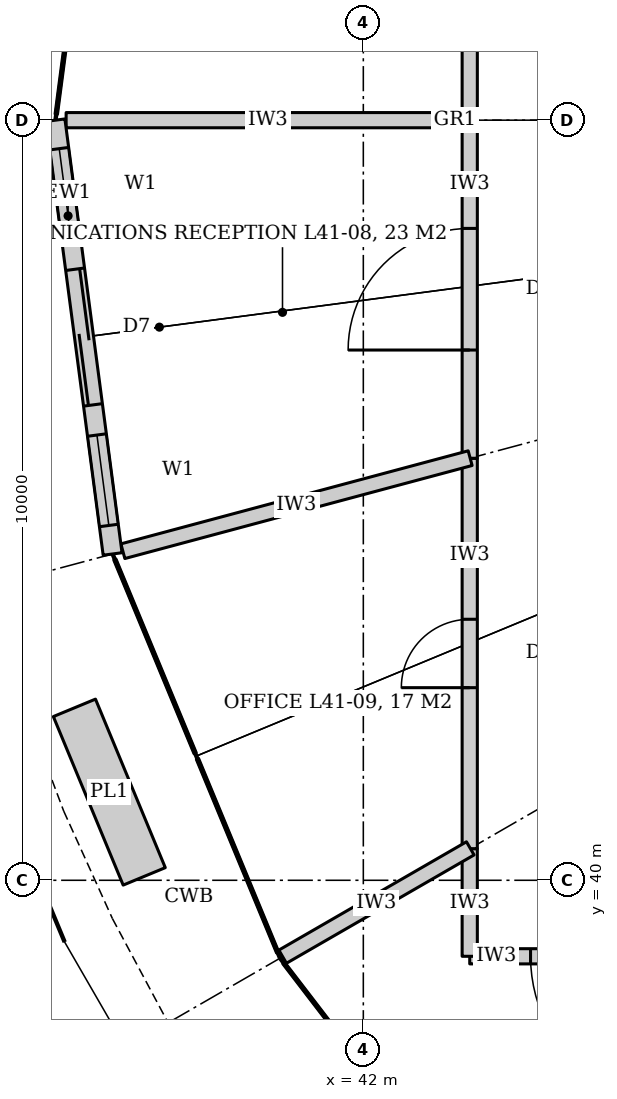
"""IFC4 building model, lengths in metres.
Left out: names, types, materials, properties, quantities, classifications, styles, units other than length and angle.
Written with IfcOpenShell. Run it as: python <this file> out.ifc"""

import sys

from ifc_helpers import new_model, si_unit, direction, frame, frame_2d, origin, place, context, subcontext, project, spatial, rectangle, extrude, element, fill, save


model = new_model("IFC4")
c1 = context("Model", 3, precision=1e-05, world=origin(), true_north=direction((0.0, 1.0)))
c2 = subcontext(c1, "Body", "Model", "MODEL_VIEW")
j1 = project(units=[si_unit("LENGTHUNIT", "METRE"), si_unit("PLANEANGLEUNIT", "RADIAN")], contexts=[c1])
p1 = place(None, origin())
s1 = spatial("IfcSite", under=j1, at=p1, CompositionType="ELEMENT")
p2 = place(p1, origin())
s2 = spatial("IfcBuilding", under=s1, at=p2, CompositionType="ELEMENT")
p3 = place(p2, frame((0.0, 0.0, 173.0)))
s3 = spatial("IfcBuildingStorey", under=s2, at=p3, CompositionType="ELEMENT", Elevation=173.0)
p4 = place(p3, frame((47.0, 39.0, 0.0), z_axis=(0.0, 0.0, 1.0), x_axis=(-1.0, 0.0, 0.0)))
e1 = element("IfcWall", 1, at=p4, inside=s3, PredefinedType="PARTITIONING", context=c2, shape_type="SweptSolid", body=[
    extrude(rectangle(XDim=3.6, YDim=0.2, at=frame_2d((1.8, 0.0))), origin(), (0.0, 0.0, 1.0), 3.04),
])
p5 = place(p4, frame((0.8, 0.0, 0.0)))
e2 = element("IfcOpeningElement", 2, at=p5, cuts=e1, PredefinedType="OPENING", context=c2, shape_type="SweptSolid", body=[
    extrude(rectangle(XDim=2.0, YDim=2.1, at=frame_2d((1.0, 1.05))), frame((0.0, 0.11, 0.0), z_axis=(0.0, -1.0, 0.0), x_axis=(1.0, 0.0, 0.0)), (0.0, 0.0, 1.0), 0.22),
])
p6 = place(p3, frame((43.4, 39.0, 0.0), z_axis=(0.0, 0.0, 1.0), x_axis=(0.0, 1.0, 0.0)))
e3 = element("IfcWall", 3, at=p6, inside=s3, PredefinedType="PARTITIONING", context=c2, shape_type="SweptSolid", body=[
    extrude(rectangle(XDim=1.416, YDim=0.2, at=frame_2d((0.708, 0.0))), origin(), (0.0, 0.0, 1.0), 3.012),
])
p7 = place(p3, frame((43.4, 40.416, 0.0), z_axis=(0.0, 0.0, 1.0), x_axis=(0.0, 1.0, 0.0)))
e4 = element("IfcWall", 4, at=p7, inside=s3, PredefinedType="PARTITIONING", context=c2, shape_type="SweptSolid", body=[
    extrude(rectangle(XDim=5.136, YDim=0.2, at=frame_2d((2.568, 0.0))), origin(), (0.0, 0.0, 1.0), 3.012),
])
p8 = place(p7, frame((2.118, 0.0, 0.0)))
e5 = element("IfcOpeningElement", 5, at=p8, cuts=e4, PredefinedType="OPENING", context=c2, shape_type="SweptSolid", body=[
    extrude(rectangle(XDim=0.9, YDim=2.4, at=frame_2d((0.45, 1.2))), frame((0.0, 0.11, 0.0), z_axis=(0.0, -1.0, 0.0), x_axis=(1.0, 0.0, 0.0)), (0.0, 0.0, 1.0), 0.22),
])
p9 = place(p3, frame((43.4, 45.552, 0.0), z_axis=(0.0, 0.0, 1.0), x_axis=(0.0, 1.0, 0.0)))
e6 = element("IfcWall", 6, at=p9, inside=s3, PredefinedType="PARTITIONING", context=c2, shape_type="SweptSolid", body=[
    extrude(rectangle(XDim=4.448, YDim=0.2, at=frame_2d((2.224, 0.0))), origin(), (0.0, 0.0, 1.0), 3.012),
])
p10 = place(p9, frame((1.424, 0.0, 0.0)))
e7 = element("IfcOpeningElement", 7, at=p10, cuts=e6, PredefinedType="OPENING", context=c2, shape_type="SweptSolid", body=[
    extrude(rectangle(XDim=1.6, YDim=2.4, at=frame_2d((0.8, 1.2))), frame((0.0, 0.11, 0.0), z_axis=(0.0, -1.0, 0.0), x_axis=(1.0, 0.0, 0.0)), (0.0, 0.0, 1.0), 0.22),
])
p11 = place(p3, frame((43.4, 50.0, 0.0), z_axis=(0.0, 0.0, 1.0), x_axis=(0.0, 1.0, 0.0)))
e8 = element("IfcWall", 8, at=p11, inside=s3, PredefinedType="PARTITIONING", context=c2, shape_type="SweptSolid", body=[
    extrude(rectangle(XDim=9.05, YDim=0.2, at=frame_2d((4.525, 0.0))), origin(), (0.0, 0.0, 1.0), 3.012),
])
p12 = place(p11, frame((4.025, 0.0, 0.0)))
e9 = element("IfcOpeningElement", 9, at=p12, cuts=e8, PredefinedType="OPENING", context=c2, shape_type="SweptSolid", body=[
    extrude(rectangle(XDim=1.0, YDim=2.4, at=frame_2d((0.5, 1.2))), frame((0.0, 0.11, 0.0), z_axis=(0.0, -1.0, 0.0), x_axis=(1.0, 0.0, 0.0)), (0.0, 0.0, 1.0), 0.22),
])
p13 = place(p3, frame((43.4, 50.0, 0.0), z_axis=(0.0, 0.0, 1.0), x_axis=(-1.0, 0.0, 0.0)))
e10 = element("IfcWall", 10, at=p13, inside=s3, PredefinedType="PARTITIONING", context=c2, shape_type="SweptSolid", body=[
    extrude(rectangle(XDim=1.81, YDim=0.125, at=frame_2d((0.905, 0.0))), origin(), (0.0, 0.0, 1.0), 3.012),
])
p14 = place(p3, frame((43.406, 45.553, 0.0), z_axis=(0.0, 0.0, 1.0), x_axis=(-0.965932258808, -0.25879503742, 0.0)))
e11 = element("IfcWall", 11, at=p14, inside=s3, PredefinedType="PARTITIONING", context=c2, shape_type="SweptSolid", body=[
    extrude(rectangle(XDim=4.83, YDim=0.2, at=frame_2d((2.415, 0.0))), origin(), (0.0, 0.0, 1.0), 3.012),
])
p15 = place(p3, frame((43.407, 40.42, 0.0), z_axis=(0.0, 0.0, 1.0), x_axis=(-0.866039495442, -0.49997559174, 0.0)))
e12 = element("IfcWall", 12, at=p15, inside=s3, PredefinedType="PARTITIONING", context=c2, shape_type="SweptSolid", body=[
    extrude(rectangle(XDim=2.95, YDim=0.2, at=frame_2d((1.475, 0.0))), origin(), (0.0, 0.0, 1.0), 3.012),
])
p16 = place(p3, frame((41.45, 50.0, 0.0), z_axis=(0.0, 0.0, 1.0), x_axis=(-0.444556644785, -0.895750740763, 0.0)))
e13 = element("IfcWall", 13, at=p16, inside=s3, PredefinedType="SOLIDWALL", context=c2, shape_type="SweptSolid", body=[
    extrude(rectangle(XDim=6.4, YDim=0.25, at=frame_2d((3.2, 0.0))), origin(), (0.0, 0.0, 1.0), 4.04),
])
p17 = place(p16, frame((2.3, 0.0, 0.0)))
e14 = element("IfcOpeningElement", 14, at=p17, cuts=e13, PredefinedType="OPENING", context=c2, shape_type="SweptSolid", body=[
    extrude(rectangle(XDim=1.8, YDim=2.4, at=frame_2d((0.9, 1.2))), frame((0.0, 0.135, 0.0), z_axis=(0.0, -1.0, 0.0), x_axis=(1.0, 0.0, 0.0)), (0.0, 0.0, 1.0), 0.27),
])
p18 = place(p16, frame((0.7, 0.0, 0.0)))
e15 = element("IfcOpeningElement", 15, at=p18, cuts=e13, PredefinedType="OPENING", context=c2, shape_type="SweptSolid", body=[
    extrude(rectangle(XDim=1.2, YDim=2.4, at=frame_2d((0.6, 1.2))), frame((0.0, 0.135, 0.0), z_axis=(0.0, -1.0, 0.0), x_axis=(1.0, 0.0, 0.0)), (0.0, 0.0, 1.0), 0.27),
])
p19 = place(p16, frame((4.5, 0.0, 0.0)))
e16 = element("IfcOpeningElement", 16, at=p19, cuts=e13, PredefinedType="OPENING", context=c2, shape_type="SweptSolid", body=[
    extrude(rectangle(XDim=1.2, YDim=2.4, at=frame_2d((0.6, 1.2))), frame((0.0, 0.135, 0.0), z_axis=(0.0, -1.0, 0.0), x_axis=(1.0, 0.0, 0.0)), (0.0, 0.0, 1.0), 0.27),
])
p20 = place(p10, origin())
e17 = element("IfcDoor", 17, at=p20, inside=s3, OperationType="DOUBLE_DOOR_DOUBLE_SWING", PredefinedType="DOOR", context=c2, shape_type="SweptSolid", body=[
    extrude(rectangle(XDim=1.6, YDim=2.4, at=frame_2d((0.8, 1.2))), frame((0.0, 0.025, 0.0), z_axis=(0.0, -1.0, 0.0), x_axis=(1.0, 0.0, 0.0)), (0.0, 0.0, 1.0), 0.05),
])
fill(e7, e17)
p21 = place(p8, origin())
e18 = element("IfcDoor", 18, at=p21, inside=s3, OperationType="SINGLE_SWING_LEFT", PredefinedType="DOOR", context=c2, shape_type="SweptSolid", body=[
    extrude(rectangle(XDim=0.9, YDim=2.4, at=frame_2d((0.45, 1.2))), frame((0.0, 0.025, 0.0), z_axis=(0.0, -1.0, 0.0), x_axis=(1.0, 0.0, 0.0)), (0.0, 0.0, 1.0), 0.05),
])
fill(e5, e18)
p22 = place(p5, origin())
e19 = element("IfcDoor", 19, at=p22, inside=s3, OperationType="DOUBLE_DOOR_DOUBLE_SWING", PredefinedType="DOOR", context=c2, shape_type="SweptSolid", body=[
    extrude(rectangle(XDim=2.0, YDim=2.1, at=frame_2d((1.0, 1.05))), frame((0.0, 0.025, 0.0), z_axis=(0.0, -1.0, 0.0), x_axis=(1.0, 0.0, 0.0)), (0.0, 0.0, 1.0), 0.05),
])
fill(e2, e19)
p23 = place(p17, origin())
e20 = element("IfcDoor", 20, at=p23, inside=s3, OperationType="DOUBLE_DOOR_SLIDING", PredefinedType="DOOR", context=c2, shape_type="SweptSolid", body=[
    extrude(rectangle(XDim=1.8, YDim=2.4, at=frame_2d((0.9, 1.2))), frame((0.0, 0.025, 0.0), z_axis=(0.0, -1.0, 0.0), x_axis=(1.0, 0.0, 0.0)), (0.0, 0.0, 1.0), 0.05),
])
fill(e14, e20)
p24 = place(p18, origin())
e21 = element("IfcWindow", 21, at=p24, inside=s3, PartitioningType="SINGLE_PANEL", PredefinedType="WINDOW", context=c2, shape_type="SweptSolid", body=[
    extrude(rectangle(XDim=1.2, YDim=2.4, at=frame_2d((0.6, 1.2))), frame((0.0, 0.03, 0.0), z_axis=(0.0, -1.0, 0.0), x_axis=(1.0, 0.0, 0.0)), (0.0, 0.0, 1.0), 0.06),
])
fill(e15, e21)
p25 = place(p19, origin())
e22 = element("IfcWindow", 22, at=p25, inside=s3, PartitioningType="SINGLE_PANEL", PredefinedType="WINDOW", context=c2, shape_type="SweptSolid", body=[
    extrude(rectangle(XDim=1.2, YDim=2.4, at=frame_2d((0.6, 1.2))), frame((0.0, 0.03, 0.0), z_axis=(0.0, -1.0, 0.0), x_axis=(1.0, 0.0, 0.0)), (0.0, 0.0, 1.0), 0.06),
])
fill(e16, e22)
save(model, sys.argv[1])
